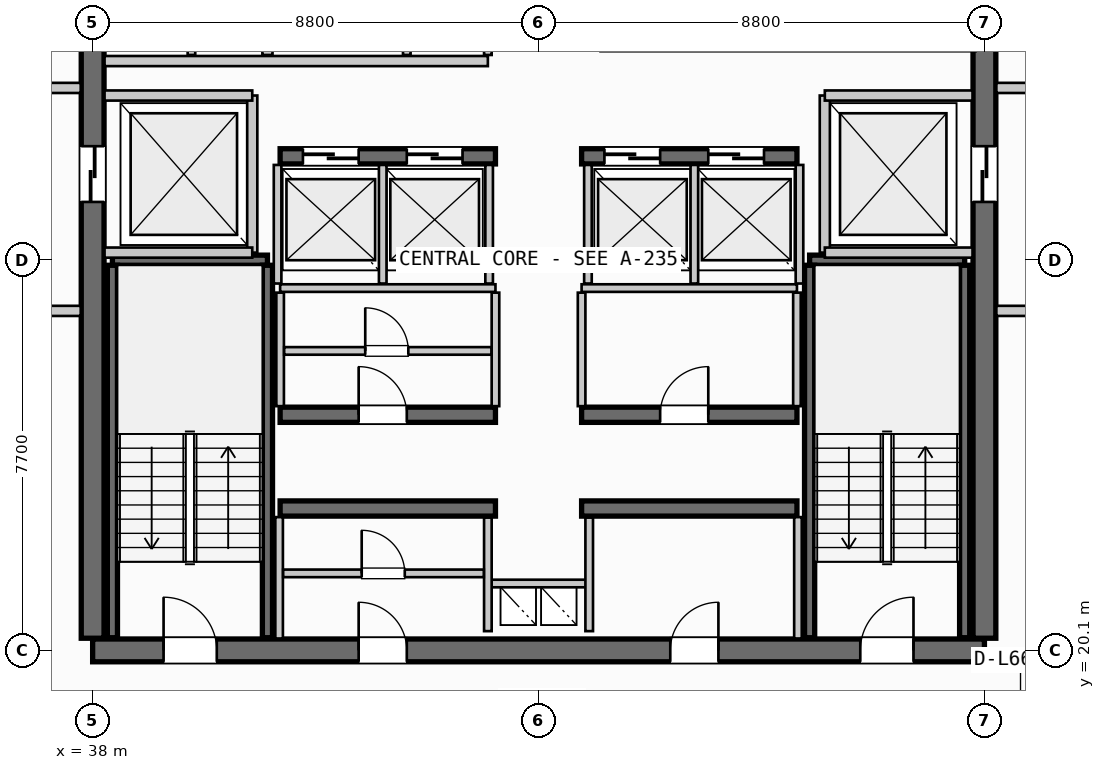
"""IFC4 building model, lengths in metres.
Left out: names, types, materials, properties, quantities, classifications, styles, units other than length and angle.
Written with IfcOpenShell. Run it as: python <this file> out.ifc"""

import sys

from ifc_helpers import new_model, si_unit, direction, frame, frame_2d, origin, place, context, subcontext, project, spatial, rectangle, extrude, source, transform, mapped, element, fill, save


model = new_model("IFC4")
c1 = context("Model", 3, precision=1e-05, world=origin(), true_north=direction((0.0, 1.0)))
c2 = subcontext(c1, "Body", "Model", "MODEL_VIEW")
j1 = project(units=[si_unit("LENGTHUNIT", "METRE"), si_unit("PLANEANGLEUNIT", "RADIAN")], contexts=[c1])
p1 = place(None, origin())
s1 = spatial("IfcSite", under=j1, at=p1, CompositionType="ELEMENT")
p2 = place(p1, origin())
s2 = spatial("IfcBuilding", under=s1, at=p2, CompositionType="ELEMENT")
p3 = place(p2, frame((0.0, 0.0, 252.55)))
s3 = spatial("IfcBuildingStorey", under=s2, at=p3, CompositionType="ELEMENT", Elevation=252.55)
p4 = place(p3, frame((38.0, 20.1, 0.0), z_axis=(0.0, 0.0, 1.0), x_axis=(1.0, 0.0, 0.0)))
e1 = element("IfcWall", 1, at=p4, inside=s3, PredefinedType="SHEAR", context=c2, shape_type="SweptSolid", body=[
    extrude(rectangle(XDim=17.6, YDim=0.45, at=frame_2d((8.8, 0.0))), origin(), (0.0, 0.0, 1.0), 3.21),
])
p5 = place(p4, frame((1.4, 0.0, 0.0)))
e2 = element("IfcOpeningElement", 2, at=p5, cuts=e1, PredefinedType="OPENING", context=c2, shape_type="SweptSolid", body=[
    extrude(rectangle(XDim=1.05, YDim=2.15, at=frame_2d((0.525, 1.075))), frame((0.0, 0.235, 0.0), z_axis=(0.0, -1.0, 0.0), x_axis=(1.0, 0.0, 0.0)), (0.0, 0.0, 1.0), 0.47),
])
p6 = place(p4, frame((15.15, 0.0, 0.0)))
e3 = element("IfcOpeningElement", 3, at=p6, cuts=e1, PredefinedType="OPENING", context=c2, shape_type="SweptSolid", body=[
    extrude(rectangle(XDim=1.05, YDim=2.15, at=frame_2d((0.525, 1.075))), frame((0.0, 0.235, 0.0), z_axis=(0.0, -1.0, 0.0), x_axis=(1.0, 0.0, 0.0)), (0.0, 0.0, 1.0), 0.47),
])
p7 = place(p4, frame((5.25, 0.0, 0.0)))
e4 = element("IfcOpeningElement", 4, at=p7, cuts=e1, PredefinedType="OPENING", context=c2, shape_type="SweptSolid", body=[
    extrude(rectangle(XDim=0.95, YDim=2.15, at=frame_2d((0.475, 1.075))), frame((0.0, 0.235, 0.0), z_axis=(0.0, -1.0, 0.0), x_axis=(1.0, 0.0, 0.0)), (0.0, 0.0, 1.0), 0.47),
])
p8 = place(p4, frame((11.4, 0.0, 0.0)))
e5 = element("IfcOpeningElement", 5, at=p8, cuts=e1, PredefinedType="OPENING", context=c2, shape_type="SweptSolid", body=[
    extrude(rectangle(XDim=0.95, YDim=2.15, at=frame_2d((0.475, 1.075))), frame((0.0, 0.235, 0.0), z_axis=(0.0, -1.0, 0.0), x_axis=(1.0, 0.0, 0.0)), (0.0, 0.0, 1.0), 0.47),
])
p9 = place(p3, frame((38.0, 35.26, 0.0), z_axis=(0.0, 0.0, 1.0), x_axis=(0.0, -1.0, 0.0)))
e6 = element("IfcWall", 6, at=p9, inside=s3, PredefinedType="SHEAR", context=c2, shape_type="SweptSolid", body=[
    extrude(rectangle(XDim=14.92, YDim=0.45, at=frame_2d((7.46, 0.0))), origin(), (0.0, 0.0, 1.0), 3.21),
])
p10 = place(p9, frame((5.21, 0.0, 0.0)))
e7 = element("IfcOpeningElement", 7, at=p10, cuts=e6, PredefinedType="OPENING", context=c2, shape_type="SweptSolid", body=[
    extrude(rectangle(XDim=1.1, YDim=2.2, at=frame_2d((0.55, 1.1))), frame((0.0, 0.235, 0.0), z_axis=(0.0, -1.0, 0.0), x_axis=(1.0, 0.0, 0.0)), (0.0, 0.0, 1.0), 0.47),
])
p11 = place(p3, frame((55.6, 20.34, 0.0), z_axis=(0.0, 0.0, 1.0), x_axis=(0.0, 1.0, 0.0)))
e8 = element("IfcWall", 8, at=p11, inside=s3, PredefinedType="SHEAR", context=c2, shape_type="SweptSolid", body=[
    extrude(rectangle(XDim=14.92, YDim=0.45, at=frame_2d((7.46, 0.0))), origin(), (0.0, 0.0, 1.0), 3.21),
])
p12 = place(p11, frame((12.71, 0.0, 0.0)))
e9 = element("IfcOpeningElement", 9, at=p12, cuts=e8, PredefinedType="OPENING", context=c2, shape_type="SweptSolid", body=[
    extrude(rectangle(XDim=1.05, YDim=2.15, at=frame_2d((0.525, 1.075))), frame((0.0, 0.235, 0.0), z_axis=(0.0, -1.0, 0.0), x_axis=(1.0, 0.0, 0.0)), (0.0, 0.0, 1.0), 0.47),
])
p13 = place(p11, frame((8.61, 0.0, 0.0)))
e10 = element("IfcOpeningElement", 10, at=p13, cuts=e8, PredefinedType="OPENING", context=c2, shape_type="SweptSolid", body=[
    extrude(rectangle(XDim=1.1, YDim=2.2, at=frame_2d((0.55, 1.1))), frame((0.0, 0.235, 0.0), z_axis=(0.0, -1.0, 0.0), x_axis=(1.0, 0.0, 0.0)), (0.0, 0.0, 1.0), 0.47),
])
for number, where, z_axis, x_axis in (
    (11, (41.7, 22.9, 0.0), (0.0, 0.0, 1.0), (1.0, 0.0, 0.0)),
    (12, (47.65, 22.9, 0.0), (0.0, 0.0, 1.0), (1.0, 0.0, 0.0)),
):
    element("IfcWall", number, at=place(p3, frame(where, z_axis=z_axis, x_axis=x_axis)), inside=s3, PredefinedType="SHEAR", context=c2, shape_type="SweptSolid", body=[
        extrude(rectangle(XDim=4.25, YDim=0.3, at=frame_2d((2.125, 0.0))), origin(), (0.0, 0.0, 1.0), 3.21),
    ])
p14 = place(p3, frame((41.7, 24.75, 0.0), z_axis=(0.0, 0.0, 1.0), x_axis=(1.0, 0.0, 0.0)))
e13 = element("IfcWall", 13, at=p14, inside=s3, PredefinedType="SHEAR", context=c2, shape_type="SweptSolid", body=[
    extrude(rectangle(XDim=4.25, YDim=0.3, at=frame_2d((2.125, 0.0))), origin(), (0.0, 0.0, 1.0), 3.21),
])
p15 = place(p14, frame((1.55, 0.0, 0.0)))
e14 = element("IfcOpeningElement", 14, at=p15, cuts=e13, PredefinedType="OPENING", context=c2, shape_type="SweptSolid", body=[
    extrude(rectangle(XDim=0.95, YDim=2.15, at=frame_2d((0.475, 1.075))), frame((0.0, 0.16, 0.0), z_axis=(0.0, -1.0, 0.0), x_axis=(1.0, 0.0, 0.0)), (0.0, 0.0, 1.0), 0.32),
])
p16 = place(p3, frame((47.65, 24.75, 0.0), z_axis=(0.0, 0.0, 1.0), x_axis=(1.0, 0.0, 0.0)))
e15 = element("IfcWall", 15, at=p16, inside=s3, PredefinedType="SHEAR", context=c2, shape_type="SweptSolid", body=[
    extrude(rectangle(XDim=4.25, YDim=0.3, at=frame_2d((2.125, 0.0))), origin(), (0.0, 0.0, 1.0), 3.21),
])
p17 = place(p16, frame((1.55, 0.0, 0.0)))
e16 = element("IfcOpeningElement", 16, at=p17, cuts=e15, PredefinedType="OPENING", context=c2, shape_type="SweptSolid", body=[
    extrude(rectangle(XDim=0.95, YDim=2.15, at=frame_2d((0.475, 1.075))), frame((0.0, 0.16, 0.0), z_axis=(0.0, -1.0, 0.0), x_axis=(1.0, 0.0, 0.0)), (0.0, 0.0, 1.0), 0.32),
])
p18 = place(p3, frame((41.7, 29.85, 0.0), z_axis=(0.0, 0.0, 1.0), x_axis=(1.0, 0.0, 0.0)))
e17 = element("IfcWall", 17, at=p18, inside=s3, PredefinedType="SHEAR", context=c2, shape_type="SweptSolid", body=[
    extrude(rectangle(XDim=4.25, YDim=0.3, at=frame_2d((2.125, 0.0))), origin(), (0.0, 0.0, 1.0), 3.21),
])
p19 = place(p18, frame((0.45, 0.0, 0.0)))
e18 = element("IfcOpeningElement", 18, at=p19, cuts=e17, PredefinedType="OPENING", context=c2, shape_type="SweptSolid", body=[
    extrude(rectangle(XDim=1.1, YDim=2.2, at=frame_2d((0.55, 1.1))), frame((0.0, 0.16, 0.0), z_axis=(0.0, -1.0, 0.0), x_axis=(1.0, 0.0, 0.0)), (0.0, 0.0, 1.0), 0.32),
])
p20 = place(p18, frame((2.5, 0.0, 0.0)))
e19 = element("IfcOpeningElement", 19, at=p20, cuts=e17, PredefinedType="OPENING", context=c2, shape_type="SweptSolid", body=[
    extrude(rectangle(XDim=1.1, YDim=2.2, at=frame_2d((0.55, 1.1))), frame((0.0, 0.16, 0.0), z_axis=(0.0, -1.0, 0.0), x_axis=(1.0, 0.0, 0.0)), (0.0, 0.0, 1.0), 0.32),
])
p21 = place(p3, frame((47.65, 29.85, 0.0), z_axis=(0.0, 0.0, 1.0), x_axis=(1.0, 0.0, 0.0)))
e20 = element("IfcWall", 20, at=p21, inside=s3, PredefinedType="SHEAR", context=c2, shape_type="SweptSolid", body=[
    extrude(rectangle(XDim=4.25, YDim=0.3, at=frame_2d((2.125, 0.0))), origin(), (0.0, 0.0, 1.0), 3.21),
])
p22 = place(p21, frame((0.45, 0.0, 0.0)))
e21 = element("IfcOpeningElement", 21, at=p22, cuts=e20, PredefinedType="OPENING", context=c2, shape_type="SweptSolid", body=[
    extrude(rectangle(XDim=1.1, YDim=2.2, at=frame_2d((0.55, 1.1))), frame((0.0, 0.16, 0.0), z_axis=(0.0, -1.0, 0.0), x_axis=(1.0, 0.0, 0.0)), (0.0, 0.0, 1.0), 0.32),
])
p23 = place(p21, frame((2.5, 0.0, 0.0)))
e22 = element("IfcOpeningElement", 22, at=p23, cuts=e20, PredefinedType="OPENING", context=c2, shape_type="SweptSolid", body=[
    extrude(rectangle(XDim=1.1, YDim=2.2, at=frame_2d((0.55, 1.1))), frame((0.0, 0.16, 0.0), z_axis=(0.0, -1.0, 0.0), x_axis=(1.0, 0.0, 0.0)), (0.0, 0.0, 1.0), 0.32),
])
p24 = place(p3, frame((38.39, 27.8, 0.0), z_axis=(0.0, 0.0, 1.0), x_axis=(1.0, 0.0, 0.0)))
e23 = element("IfcWall", 23, at=p24, inside=s3, PredefinedType="SHEAR", context=c2, shape_type="SweptSolid", body=[
    extrude(rectangle(XDim=3.06, YDim=0.2, at=frame_2d((1.53, 0.0))), origin(), (0.0, 0.0, 1.0), 3.21),
])
for number, where, z_axis, x_axis in (
    (24, (41.45, 27.7, 0.0), (0.0, 0.0, 1.0), (0.0, -1.0, 0.0)),
    (25, (38.39, 20.35, 0.0), (0.0, 0.0, 1.0), (0.0, 1.0, 0.0)),
):
    element("IfcWall", number, at=place(p3, frame(where, z_axis=z_axis, x_axis=x_axis)), inside=s3, PredefinedType="SHEAR", context=c2, shape_type="SweptSolid", body=[
        extrude(rectangle(XDim=7.35, YDim=0.2, at=frame_2d((3.675, 0.0))), origin(), (0.0, 0.0, 1.0), 3.21),
    ])
p25 = place(p3, frame((52.15, 27.8, 0.0), z_axis=(0.0, 0.0, 1.0), x_axis=(1.0, 0.0, 0.0)))
e26 = element("IfcWall", 26, at=p25, inside=s3, PredefinedType="SHEAR", context=c2, shape_type="SweptSolid", body=[
    extrude(rectangle(XDim=3.06, YDim=0.2, at=frame_2d((1.53, 0.0))), origin(), (0.0, 0.0, 1.0), 3.21),
])
for number, where, z_axis, x_axis in (
    (27, (55.21, 27.7, 0.0), (0.0, 0.0, 1.0), (0.0, -1.0, 0.0)),
    (28, (52.15, 20.35, 0.0), (0.0, 0.0, 1.0), (0.0, 1.0, 0.0)),
):
    element("IfcWall", number, at=place(p3, frame(where, z_axis=z_axis, x_axis=x_axis)), inside=s3, PredefinedType="SHEAR", context=c2, shape_type="SweptSolid", body=[
        extrude(rectangle(XDim=7.35, YDim=0.2, at=frame_2d((3.675, 0.0))), origin(), (0.0, 0.0, 1.0), 3.21),
    ])
p26 = place(p3, frame((45.8, 21.42, 0.0), z_axis=(0.0, 0.0, 1.0), x_axis=(1.0, 0.0, 0.0)))
e29 = element("IfcWall", 29, at=p26, inside=s3, PredefinedType="PARTITIONING", context=c2, shape_type="SweptSolid", body=[
    extrude(rectangle(XDim=2.0, YDim=0.15, at=frame_2d((1.0, 0.0))), origin(), (0.0, 0.0, 1.0), 2.28),
])
for number, where, z_axis, x_axis in (
    (30, (45.8, 20.48, 0.0), (0.0, 0.0, 1.0), (0.0, 1.0, 0.0)),
    (31, (47.8, 20.48, 0.0), (0.0, 0.0, 1.0), (0.0, 1.0, 0.0)),
):
    element("IfcWall", number, at=place(p3, frame(where, z_axis=z_axis, x_axis=x_axis)), inside=s3, PredefinedType="PARTITIONING", context=c2, shape_type="SweptSolid", body=[
        extrude(rectangle(XDim=2.24, YDim=0.15, at=frame_2d((1.12, 0.0))), origin(), (0.0, 0.0, 1.0), 2.28),
    ])
p27 = place(p3, frame((41.15, 27.95, 0.0), z_axis=(0.0, 0.0, 1.0), x_axis=(0.0, 1.0, 0.0)))
e32 = element("IfcWall", 32, at=p27, inside=s3, PredefinedType="PARTITIONING", context=c2, shape_type="SweptSolid", body=[
    extrude(rectangle(XDim=3.1, YDim=0.2, at=frame_2d((1.55, 0.0))), origin(), (0.0, 0.0, 1.0), 2.28),
])
for number, where, z_axis, x_axis in (
    (33, (38.235, 27.95, 0.0), (0.0, 0.0, 1.0), (1.0, 0.0, 0.0)),
    (34, (38.235, 31.05, 0.0), (0.0, 0.0, 1.0), (1.0, 0.0, 0.0)),
):
    element("IfcWall", number, at=place(p3, frame(where, z_axis=z_axis, x_axis=x_axis)), inside=s3, PredefinedType="PARTITIONING", context=c2, shape_type="SweptSolid", body=[
        extrude(rectangle(XDim=2.915, YDim=0.2, at=frame_2d((1.458, 0.0))), origin(), (0.0, 0.0, 1.0), 2.28),
    ])
for number, where, z_axis, x_axis in (
    (35, (34.5, 26.8, 0.0), (0.0, 0.0, 1.0), (1.0, 0.0, 0.0)),
    (36, (34.5, 31.2, 0.0), (0.0, 0.0, 1.0), (1.0, 0.0, 0.0)),
):
    element("IfcWall", number, at=place(p3, frame(where, z_axis=z_axis, x_axis=x_axis)), inside=s3, PredefinedType="PARTITIONING", context=c2, shape_type="SweptSolid", body=[
        extrude(rectangle(XDim=3.265, YDim=0.2, at=frame_2d((1.632, 0.0))), origin(), (0.0, 0.0, 1.0), 2.28),
    ])
p28 = place(p3, frame((52.45, 27.95, 0.0), z_axis=(0.0, 0.0, 1.0), x_axis=(0.0, 1.0, 0.0)))
e37 = element("IfcWall", 37, at=p28, inside=s3, PredefinedType="PARTITIONING", context=c2, shape_type="SweptSolid", body=[
    extrude(rectangle(XDim=3.1, YDim=0.2, at=frame_2d((1.55, 0.0))), origin(), (0.0, 0.0, 1.0), 2.28),
])
for number, where, z_axis, x_axis in (
    (38, (52.45, 27.95, 0.0), (0.0, 0.0, 1.0), (1.0, 0.0, 0.0)),
    (39, (52.45, 31.05, 0.0), (0.0, 0.0, 1.0), (1.0, 0.0, 0.0)),
):
    element("IfcWall", number, at=place(p3, frame(where, z_axis=z_axis, x_axis=x_axis)), inside=s3, PredefinedType="PARTITIONING", context=c2, shape_type="SweptSolid", body=[
        extrude(rectangle(XDim=2.915, YDim=0.2, at=frame_2d((1.458, 0.0))), origin(), (0.0, 0.0, 1.0), 2.28),
    ])
for number, where, z_axis, x_axis in (
    (40, (55.835, 26.8, 0.0), (0.0, 0.0, 1.0), (1.0, 0.0, 0.0)),
    (41, (55.835, 31.2, 0.0), (0.0, 0.0, 1.0), (1.0, 0.0, 0.0)),
):
    element("IfcWall", number, at=place(p3, frame(where, z_axis=z_axis, x_axis=x_axis)), inside=s3, PredefinedType="PARTITIONING", context=c2, shape_type="SweptSolid", body=[
        extrude(rectangle(XDim=3.265, YDim=0.2, at=frame_2d((1.633, 0.0))), origin(), (0.0, 0.0, 1.0), 2.28),
    ])
for number, where, z_axis, x_axis in (
    (42, (41.68, 20.335, 0.0), (0.0, 0.0, 1.0), (0.0, 1.0, 0.0)),
    (43, (51.92, 20.335, 0.0), (0.0, 0.0, 1.0), (0.0, 1.0, 0.0)),
):
    element("IfcWall", number, at=place(p3, frame(where, z_axis=z_axis, x_axis=x_axis)), inside=s3, PredefinedType="PARTITIONING", context=c2, shape_type="SweptSolid", body=[
        extrude(rectangle(XDim=2.395, YDim=0.15, at=frame_2d((1.198, 0.0))), origin(), (0.0, 0.0, 1.0), 2.28),
    ])
p29 = place(p3, frame((41.76, 21.62, 0.0), z_axis=(0.0, 0.0, 1.0), x_axis=(1.0, 0.0, 0.0)))
e44 = element("IfcWall", 44, at=p29, inside=s3, PredefinedType="PARTITIONING", context=c2, shape_type="SweptSolid", body=[
    extrude(rectangle(XDim=3.96, YDim=0.15, at=frame_2d((1.98, 0.0))), origin(), (0.0, 0.0, 1.0), 2.28),
])
p30 = place(p29, frame((1.55, 0.0, 0.0)))
e45 = element("IfcOpeningElement", 45, at=p30, cuts=e44, PredefinedType="OPENING", context=c2, shape_type="SweptSolid", body=[
    extrude(rectangle(XDim=0.85, YDim=2.15, at=frame_2d((0.425, 1.075))), frame((0.0, 0.085, 0.0), z_axis=(0.0, -1.0, 0.0), x_axis=(1.0, 0.0, 0.0)), (0.0, 0.0, 1.0), 0.17),
])
for number, where, z_axis, x_axis in (
    (46, (41.7, 27.25, 0.0), (0.0, 0.0, 1.0), (1.0, 0.0, 0.0)),
    (47, (47.65, 27.25, 0.0), (0.0, 0.0, 1.0), (1.0, 0.0, 0.0)),
):
    element("IfcWall", number, at=place(p3, frame(where, z_axis=z_axis, x_axis=x_axis)), inside=s3, PredefinedType="PARTITIONING", context=c2, shape_type="SweptSolid", body=[
        extrude(rectangle(XDim=4.25, YDim=0.15, at=frame_2d((2.125, 0.0))), origin(), (0.0, 0.0, 1.0), 2.28),
    ])
for number, where, z_axis, x_axis in (
    (48, (41.7, 24.92, 0.0), (0.0, 0.0, 1.0), (0.0, 1.0, 0.0)),
    (49, (45.95, 24.92, 0.0), (0.0, 0.0, 1.0), (0.0, 1.0, 0.0)),
    (50, (47.65, 24.92, 0.0), (0.0, 0.0, 1.0), (0.0, 1.0, 0.0)),
    (51, (51.9, 24.92, 0.0), (0.0, 0.0, 1.0), (0.0, 1.0, 0.0)),
):
    element("IfcWall", number, at=place(p3, frame(where, z_axis=z_axis, x_axis=x_axis)), inside=s3, PredefinedType="PARTITIONING", context=c2, shape_type="SweptSolid", body=[
        extrude(rectangle(XDim=2.24, YDim=0.15, at=frame_2d((1.12, 0.0))), origin(), (0.0, 0.0, 1.0), 2.28),
    ])
p31 = place(p3, frame((41.78, 26.01, 0.0), z_axis=(0.0, 0.0, 1.0), x_axis=(1.0, 0.0, 0.0)))
e52 = element("IfcWall", 52, at=p31, inside=s3, PredefinedType="PARTITIONING", context=c2, shape_type="SweptSolid", body=[
    extrude(rectangle(XDim=4.09, YDim=0.15, at=frame_2d((2.045, 0.0))), origin(), (0.0, 0.0, 1.0), 2.28),
])
p32 = place(p31, frame((1.6, 0.0, 0.0)))
e53 = element("IfcOpeningElement", 53, at=p32, cuts=e52, PredefinedType="OPENING", context=c2, shape_type="SweptSolid", body=[
    extrude(rectangle(XDim=0.85, YDim=2.15, at=frame_2d((0.425, 1.075))), frame((0.0, 0.085, 0.0), z_axis=(0.0, -1.0, 0.0), x_axis=(1.0, 0.0, 0.0)), (0.0, 0.0, 1.0), 0.17),
])
for number, where, z_axis, x_axis in (
    (54, (41.65, 27.34, 0.0), (0.0, 0.0, 1.0), (0.0, 1.0, 0.0)),
    (55, (43.725, 27.34, 0.0), (0.0, 0.0, 1.0), (0.0, 1.0, 0.0)),
    (56, (45.825, 27.34, 0.0), (0.0, 0.0, 1.0), (0.0, 1.0, 0.0)),
    (57, (47.775, 27.34, 0.0), (0.0, 0.0, 1.0), (0.0, 1.0, 0.0)),
    (58, (49.875, 27.34, 0.0), (0.0, 0.0, 1.0), (0.0, 1.0, 0.0)),
    (59, (51.95, 27.34, 0.0), (0.0, 0.0, 1.0), (0.0, 1.0, 0.0)),
):
    element("IfcWall", number, at=place(p3, frame(where, z_axis=z_axis, x_axis=x_axis)), inside=s3, PredefinedType="PARTITIONING", context=c2, shape_type="SweptSolid", body=[
        extrude(rectangle(XDim=2.34, YDim=0.15, at=frame_2d((1.17, 0.0))), origin(), (0.0, 0.0, 1.0), 2.28),
    ])
p33 = place(p3, frame((41.45, 31.85, 0.0), z_axis=(0.0, 0.0, 1.0), x_axis=(0.0, 1.0, 0.0)))
e60 = element("IfcWall", 60, at=p33, inside=s3, PredefinedType="PARTITIONING", context=c2, shape_type="SweptSolid", body=[
    extrude(rectangle(XDim=3.415, YDim=0.2, at=frame_2d((1.708, 0.0))), origin(), (0.0, 0.0, 1.0), 2.28),
])
p34 = place(p3, frame((38.235, 31.73, 0.0), z_axis=(0.0, 0.0, 1.0), x_axis=(1.0, 0.0, 0.0)))
e61 = element("IfcWall", 61, at=p34, inside=s3, PredefinedType="PARTITIONING", context=c2, shape_type="SweptSolid", body=[
    extrude(rectangle(XDim=7.565, YDim=0.2, at=frame_2d((3.782, 0.0))), origin(), (0.0, 0.0, 1.0), 2.28),
])
for number, where, z_axis, x_axis in (
    (62, (45.8, 31.85, 0.0), (0.0, 0.0, 1.0), (0.0, 1.0, 0.0)),
    (63, (39.95, 31.85, 0.0), (0.0, 0.0, 1.0), (0.0, 1.0, 0.0)),
):
    element("IfcWall", number, at=place(p3, frame(where, z_axis=z_axis, x_axis=x_axis)), inside=s3, PredefinedType="PARTITIONING", context=c2, shape_type="SweptSolid", body=[
        extrude(rectangle(XDim=3.415, YDim=0.15, at=frame_2d((1.708, 0.0))), origin(), (0.0, 0.0, 1.0), 2.28),
    ])
p35 = place(p3, frame((44.2, 31.85, 0.0), z_axis=(0.0, 0.0, 1.0), x_axis=(0.0, 1.0, 0.0)))
e64 = element("IfcWall", 64, at=p35, inside=s3, PredefinedType="PLUMBINGWALL", context=c2, shape_type="SweptSolid", body=[
    extrude(rectangle(XDim=3.415, YDim=0.15, at=frame_2d((1.708, 0.0))), origin(), (0.0, 0.0, 1.0), 2.28),
])
m1 = source(origin(), c2, "Body", "SweptSolid", [
    extrude(rectangle(XDim=1.05, YDim=2.15, at=frame_2d((0.525, 1.075))), frame((0.0, 0.025, 0.0), z_axis=(0.0, -1.0, 0.0), x_axis=(1.0, 0.0, 0.0)), (0.0, 0.0, 1.0), 0.05),
])
p36 = place(p5, origin())
e65 = element("IfcDoor", 65, at=p36, inside=s3, OperationType="SINGLE_SWING_LEFT", PredefinedType="DOOR", context=c2, shape_type="MappedRepresentation", body=[
    mapped(m1, transform((0.0, 0.0, 0.0), scale=1.0)),
])
fill(e2, e65)
p37 = place(p6, origin())
e66 = element("IfcDoor", 66, at=p37, inside=s3, OperationType="SINGLE_SWING_RIGHT", PredefinedType="DOOR", context=c2, shape_type="MappedRepresentation", body=[
    mapped(m1, transform((0.0, 0.0, 0.0), scale=1.0)),
])
fill(e3, e66)
m2 = source(origin(), c2, "Body", "SweptSolid", [
    extrude(rectangle(XDim=1.1, YDim=2.2, at=frame_2d((0.55, 1.1))), frame((0.0, 0.025, 0.0), z_axis=(0.0, -1.0, 0.0), x_axis=(1.0, 0.0, 0.0)), (0.0, 0.0, 1.0), 0.05),
])
p38 = place(p10, origin())
e67 = element("IfcDoor", 67, at=p38, inside=s3, OperationType="SLIDING_TO_LEFT", PredefinedType="DOOR", context=c2, shape_type="MappedRepresentation", body=[
    mapped(m2, transform((0.0, 0.0, 0.0), scale=1.0)),
])
fill(e7, e67)
p39 = place(p13, origin())
e68 = element("IfcDoor", 68, at=p39, inside=s3, OperationType="SLIDING_TO_RIGHT", PredefinedType="DOOR", context=c2, shape_type="MappedRepresentation", body=[
    mapped(m2, transform((0.0, 0.0, 0.0), scale=1.0)),
])
fill(e10, e68)
m3 = source(origin(), c2, "Body", "SweptSolid", [
    extrude(rectangle(XDim=0.95, YDim=2.15, at=frame_2d((0.475, 1.075))), frame((0.0, 0.025, 0.0), z_axis=(0.0, -1.0, 0.0), x_axis=(1.0, 0.0, 0.0)), (0.0, 0.0, 1.0), 0.05),
])
p40 = place(p7, origin())
e69 = element("IfcDoor", 69, at=p40, inside=s3, OperationType="SINGLE_SWING_LEFT", PredefinedType="DOOR", context=c2, shape_type="MappedRepresentation", body=[
    mapped(m3, transform((0.0, 0.0, 0.0), scale=1.0)),
])
fill(e4, e69)
p41 = place(p8, origin())
e70 = element("IfcDoor", 70, at=p41, inside=s3, OperationType="SINGLE_SWING_RIGHT", PredefinedType="DOOR", context=c2, shape_type="MappedRepresentation", body=[
    mapped(m3, transform((0.0, 0.0, 0.0), scale=1.0)),
])
fill(e5, e70)
p42 = place(p15, origin())
e71 = element("IfcDoor", 71, at=p42, inside=s3, OperationType="SINGLE_SWING_LEFT", PredefinedType="DOOR", context=c2, shape_type="MappedRepresentation", body=[
    mapped(m3, transform((0.0, 0.0, 0.0), scale=1.0)),
])
fill(e14, e71)
p43 = place(p17, origin())
e72 = element("IfcDoor", 72, at=p43, inside=s3, OperationType="SINGLE_SWING_RIGHT", PredefinedType="DOOR", context=c2, shape_type="MappedRepresentation", body=[
    mapped(m3, transform((0.0, 0.0, 0.0), scale=1.0)),
])
fill(e16, e72)
p44 = place(p19, origin())
e73 = element("IfcDoor", 73, at=p44, inside=s3, OperationType="SLIDING_TO_LEFT", PredefinedType="DOOR", context=c2, shape_type="MappedRepresentation", body=[
    mapped(m2, transform((0.0, 0.0, 0.0), scale=1.0)),
])
fill(e18, e73)
p45 = place(p20, origin())
e74 = element("IfcDoor", 74, at=p45, inside=s3, OperationType="SLIDING_TO_LEFT", PredefinedType="DOOR", context=c2, shape_type="MappedRepresentation", body=[
    mapped(m2, transform((0.0, 0.0, 0.0), scale=1.0)),
])
fill(e19, e74)
p46 = place(p22, origin())
e75 = element("IfcDoor", 75, at=p46, inside=s3, OperationType="SLIDING_TO_LEFT", PredefinedType="DOOR", context=c2, shape_type="MappedRepresentation", body=[
    mapped(m2, transform((0.0, 0.0, 0.0), scale=1.0)),
])
fill(e21, e75)
p47 = place(p23, origin())
e76 = element("IfcDoor", 76, at=p47, inside=s3, OperationType="SLIDING_TO_LEFT", PredefinedType="DOOR", context=c2, shape_type="MappedRepresentation", body=[
    mapped(m2, transform((0.0, 0.0, 0.0), scale=1.0)),
])
fill(e22, e76)
m4 = source(origin(), c2, "Body", "SweptSolid", [
    extrude(rectangle(XDim=0.85, YDim=2.15, at=frame_2d((0.425, 1.075))), frame((0.0, 0.025, 0.0), z_axis=(0.0, -1.0, 0.0), x_axis=(1.0, 0.0, 0.0)), (0.0, 0.0, 1.0), 0.05),
])
p48 = place(p30, origin())
e77 = element("IfcDoor", 77, at=p48, inside=s3, OperationType="SINGLE_SWING_LEFT", PredefinedType="DOOR", context=c2, shape_type="MappedRepresentation", body=[
    mapped(m4, transform((0.0, 0.0, 0.0), scale=1.0)),
])
fill(e45, e77)
p49 = place(p32, origin())
e78 = element("IfcDoor", 78, at=p49, inside=s3, OperationType="SINGLE_SWING_LEFT", PredefinedType="DOOR", context=c2, shape_type="MappedRepresentation", body=[
    mapped(m4, transform((0.0, 0.0, 0.0), scale=1.0)),
])
fill(e53, e78)
save(model, sys.argv[1])
